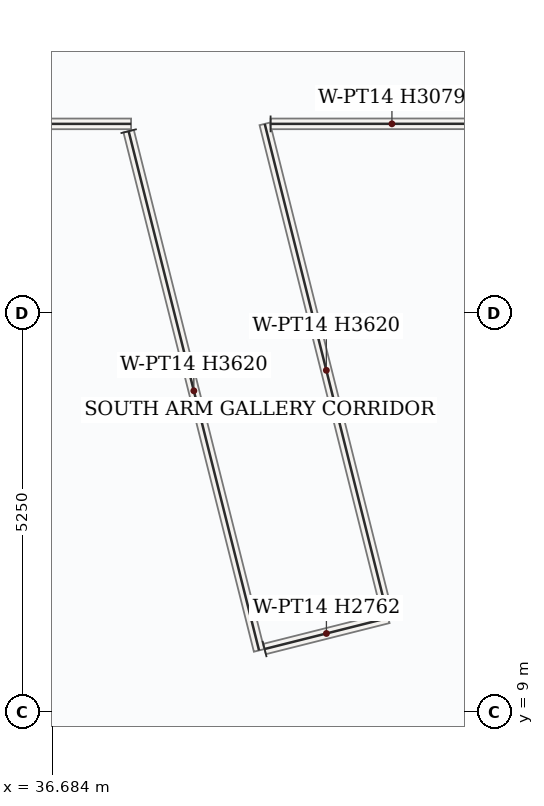
"""IFC4 building model, lengths in metres.
Left out: names, types, materials, properties, quantities, classifications, styles, units other than length and angle.
Written with IfcOpenShell. Run it as: python <this file> out.ifc"""

import sys

from ifc_helpers import new_model, si_unit, direction, frame, frame_2d, origin, place, context, subcontext, project, spatial, rectangle, extrude, source, transform, mapped, element, save


model = new_model("IFC4")
c1 = context("Model", 3, precision=1e-05, world=origin(), true_north=direction((0.0, 1.0)))
c2 = subcontext(c1, "Body", "Model", "MODEL_VIEW")
j1 = project(units=[si_unit("LENGTHUNIT", "METRE"), si_unit("PLANEANGLEUNIT", "RADIAN")], contexts=[c1])
p1 = place(None, origin())
s1 = spatial("IfcSite", under=j1, at=p1, CompositionType="ELEMENT")
p2 = place(p1, origin())
s2 = spatial("IfcBuilding", under=s1, at=p2, CompositionType="ELEMENT")
p3 = place(p2, frame((0.0, 0.0, 186.3)))
s3 = spatial("IfcBuildingStorey", under=s2, at=p3, CompositionType="ELEMENT", Elevation=186.3)
p4 = place(p3, frame((29.912, 16.74, 0.0), z_axis=(0.0, 0.0, 1.0), x_axis=(1.0, 0.0, 0.0)))
e1 = element("IfcWall", 1, at=p4, inside=s3, PredefinedType="PARTITIONING", context=c2, shape_type="SweptSolid", body=[
    extrude(rectangle(XDim=7.806, YDim=0.14, at=frame_2d((3.903, 0.0))), origin(), (0.0, 0.0, 1.0), 3.62),
])
p5 = place(p4, frame((5.348, 0.0, 0.0)))
e2 = element("IfcOpeningElement", 2, at=p5, cuts=e1, PredefinedType="OPENING", context=c2, shape_type="SweptSolid", body=[
    extrude(rectangle(XDim=0.95, YDim=2.15, at=frame_2d((0.475, 1.075))), frame((0.0, 0.08, 0.0), z_axis=(0.0, -1.0, 0.0), x_axis=(1.0, 0.0, 0.0)), (0.0, 0.0, 1.0), 0.16),
])
m1 = source(origin(), c2, "Body", "SweptSolid", [
    extrude(rectangle(XDim=7.043, YDim=0.14, at=frame_2d((3.521, 0.0))), origin(), (0.0, 0.0, 1.0), 3.62),
])
p6 = place(p3, frame((37.687, 16.644, 0.0), z_axis=(0.0, 0.0, 1.0), x_axis=(0.243587652837, -0.969878886968, 0.0)))
e3 = element("IfcWall", 3, at=p6, inside=s3, PredefinedType="PARTITIONING", context=c2, shape_type="MappedRepresentation", body=[
    mapped(m1, transform((0.0, 0.0, 0.0), x_axis=(1.0, 0.0, 0.0), y_axis=(0.0, 1.0, 0.0), z_axis=(0.0, 0.0, 1.0), scale=1.0)),
])
m2 = source(origin(), c2, "Body", "SweptSolid", [
    extrude(rectangle(XDim=1.678, YDim=0.14, at=frame_2d((0.839, 0.0))), origin(), (0.0, 0.0, 1.0), 2.762),
])
p7 = place(p3, frame((39.475, 9.831, 0.0), z_axis=(0.0, 0.0, 1.0), x_axis=(0.969799114262, 0.243905059349, 0.0)))
e4 = element("IfcWall", 4, at=p7, inside=s3, PredefinedType="PARTITIONING", context=c2, shape_type="MappedRepresentation", body=[
    mapped(m2, transform((0.0, 0.0, 0.0), x_axis=(1.0, 0.0, 0.0), y_axis=(0.0, 1.0, 0.0), z_axis=(0.0, 0.0, 1.0), scale=1.0)),
])
m3 = source(origin(), c2, "Body", "SweptSolid", [
    extrude(rectangle(XDim=6.684, YDim=0.14, at=frame_2d((3.342, 0.0))), origin(), (0.0, 0.0, 1.0), 3.62),
])
p8 = place(p3, frame((41.098, 10.256, 0.0), z_axis=(0.0, 0.0, 1.0), x_axis=(-0.24254421979, 0.970140351416, 0.0)))
e5 = element("IfcWall", 5, at=p8, inside=s3, PredefinedType="PARTITIONING", context=c2, shape_type="MappedRepresentation", body=[
    mapped(m3, transform((0.0, 0.0, 0.0), x_axis=(1.0, 0.0, 0.0), y_axis=(0.0, 1.0, 0.0), z_axis=(0.0, 0.0, 1.0), scale=1.0)),
])
m4 = source(origin(), c2, "Body", "SweptSolid", [
    extrude(rectangle(XDim=3.192, YDim=0.14, at=frame_2d((1.596, 0.0))), origin(), (0.0, 0.0, 1.0), 3.079),
])
p9 = place(p3, frame((39.554, 16.74, 0.0), z_axis=(0.0, 0.0, 1.0), x_axis=(0.999999926893, 0.000382379905, 0.0)))
e6 = element("IfcWall", 6, at=p9, inside=s3, PredefinedType="PARTITIONING", context=c2, shape_type="MappedRepresentation", body=[
    mapped(m4, transform((0.0, 0.0, 0.0), x_axis=(1.0, 0.0, 0.0), y_axis=(0.0, 1.0, 0.0), z_axis=(0.0, 0.0, 1.0), scale=1.0)),
])
save(model, sys.argv[1])
